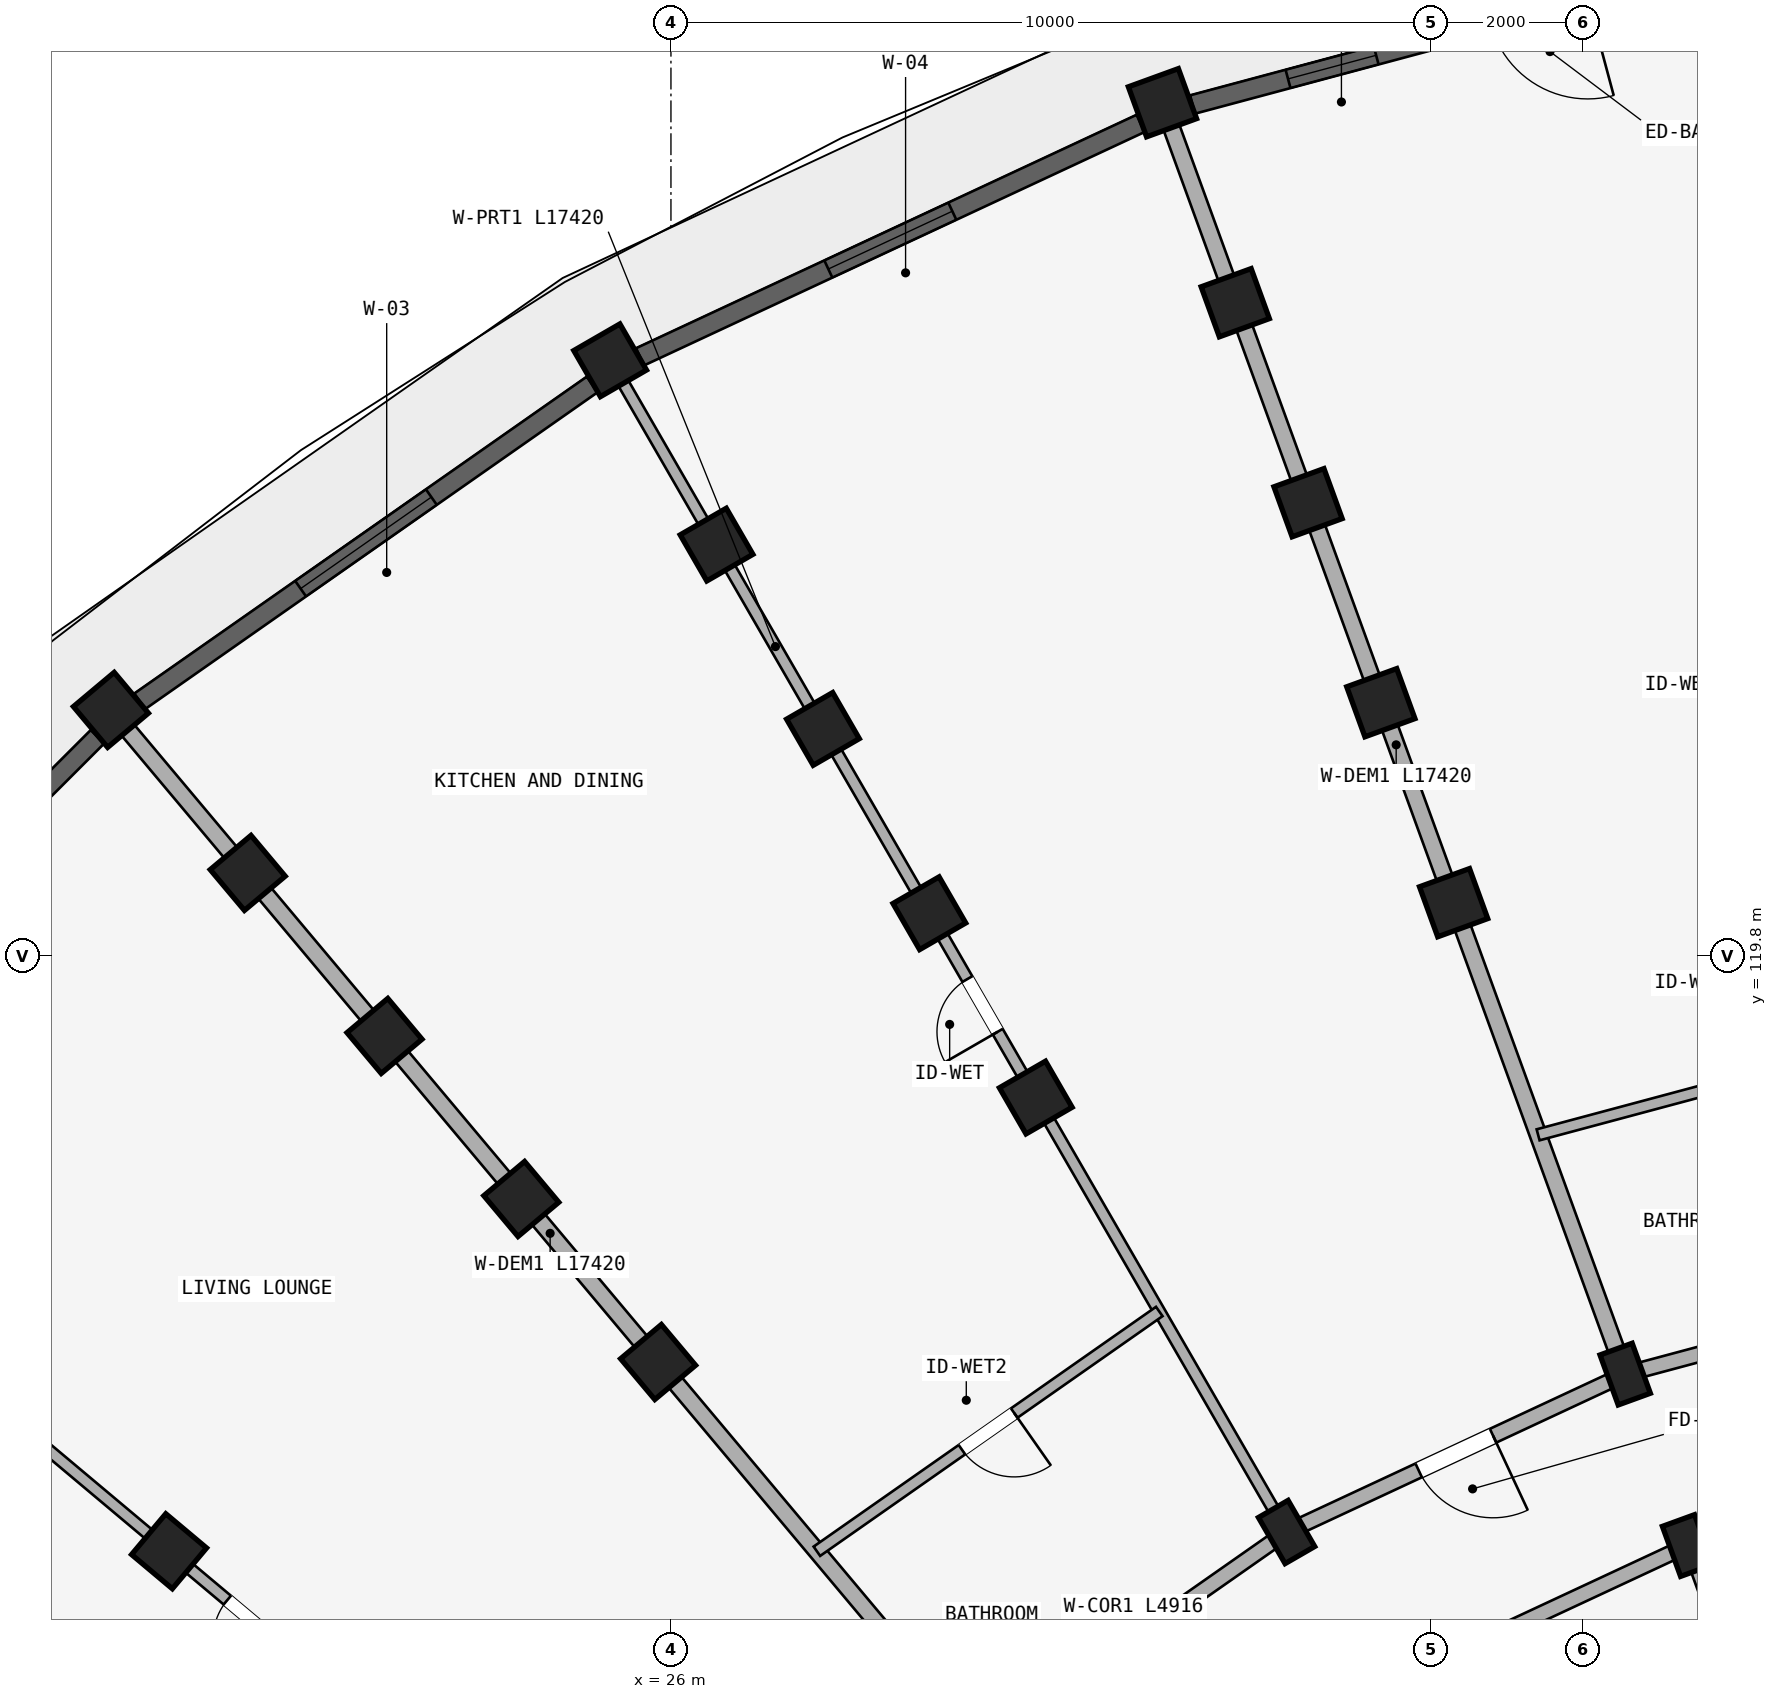
"""IFC4 building model, lengths in metres.
Left out: names, types, materials, properties, quantities, classifications, styles, units other than length and angle.
Written with IfcOpenShell. Run it as: python <this file> out.ifc"""

import sys

from ifc_helpers import new_model, si_unit, direction, frame, frame_2d, origin, origin_2d, place, context, subcontext, project, spatial, rectangle, extrude, element, fill, save


model = new_model("IFC4")
c1 = context("Model", 3, precision=1e-05, world=origin(), true_north=direction((0.0, 1.0)))
c2 = subcontext(c1, "Body", "Model", "MODEL_VIEW")
j1 = project(units=[si_unit("LENGTHUNIT", "METRE"), si_unit("PLANEANGLEUNIT", "RADIAN")], contexts=[c1])
p1 = place(None, origin())
s1 = spatial("IfcSite", under=j1, at=p1, CompositionType="ELEMENT")
p2 = place(p1, origin())
s2 = spatial("IfcBuilding", under=s1, at=p2, CompositionType="ELEMENT")
p3 = place(p2, frame((0.0, 0.0, 24.45)))
s3 = spatial("IfcBuildingStorey", under=s2, at=p3, CompositionType="ELEMENT", Elevation=24.45)
for number, where, z_axis, x_axis in (
    (1, (39.376, 112.044, 0.0), (0.0, 0.0, 1.0), (0.94, 0.342, 0.0)),
    (2, (38.555, 114.299, 0.0), (0.0, 0.0, 1.0), (0.94, 0.342, 0.0)),
):
    element("IfcColumn", number, at=place(p3, frame(where, z_axis=z_axis, x_axis=x_axis)), inside=s3, PredefinedType="COLUMN", context=c2, shape_type="SweptSolid", body=[
        extrude(rectangle(XDim=0.45, YDim=0.7, at=origin_2d()), origin(), (0.0, 0.0, 1.0), 2.93),
    ])
for number, where, z_axis, x_axis in (
    (3, (36.298, 120.501, 0.0), (0.0, 0.0, 1.0), (0.94, 0.342, 0.0)),
    (4, (35.34, 123.132, 0.0), (0.0, 0.0, 1.0), (0.94, 0.342, 0.0)),
    (5, (34.382, 125.764, 0.0), (0.0, 0.0, 1.0), (0.94, 0.342, 0.0)),
    (6, (33.425, 128.395, 0.0), (0.0, 0.0, 1.0), (0.94, 0.342, 0.0)),
    (7, (32.467, 131.026, 0.0), (0.0, 0.0, 1.0), (0.94, 0.342, 0.0)),
):
    element("IfcColumn", number, at=place(p3, frame(where, z_axis=z_axis, x_axis=x_axis)), inside=s3, PredefinedType="COLUMN", context=c2, shape_type="SweptSolid", body=[
        extrude(rectangle(XDim=0.7, YDim=0.7, at=origin_2d()), origin(), (0.0, 0.0, 1.0), 2.93),
    ])
p4 = place(p3, frame((34.1, 112.222, 0.0), z_axis=(0.0, 0.0, 1.0), x_axis=(0.866025403784, 0.5, 0.0)))
e8 = element("IfcColumn", 8, at=p4, inside=s3, PredefinedType="COLUMN", context=c2, shape_type="SweptSolid", body=[
    extrude(rectangle(XDim=0.45, YDim=0.7, at=origin_2d()), origin(), (0.0, 0.0, 1.0), 2.93),
])
for number, where, z_axis, x_axis in (
    (9, (30.8, 117.938, 0.0), (0.0, 0.0, 1.0), (0.866, 0.5, 0.0)),
    (10, (29.4, 120.363, 0.0), (0.0, 0.0, 1.0), (0.866, 0.5, 0.0)),
    (11, (28.0, 122.787, 0.0), (0.0, 0.0, 1.0), (0.866, 0.5, 0.0)),
    (12, (26.6, 125.212, 0.0), (0.0, 0.0, 1.0), (0.866, 0.5, 0.0)),
    (13, (25.2, 127.637, 0.0), (0.0, 0.0, 1.0), (0.866, 0.5, 0.0)),
    (14, (25.831, 114.458, 0.0), (0.0, 0.0, 1.0), (0.766, 0.643, 0.0)),
    (15, (24.031, 116.603, 0.0), (0.0, 0.0, 1.0), (0.766, 0.643, 0.0)),
    (16, (22.231, 118.748, 0.0), (0.0, 0.0, 1.0), (0.766, 0.643, 0.0)),
    (17, (20.432, 120.893, 0.0), (0.0, 0.0, 1.0), (0.766, 0.643, 0.0)),
    (18, (18.632, 123.038, 0.0), (0.0, 0.0, 1.0), (0.766, 0.643, 0.0)),
    (19, (19.397, 111.969, 0.0), (0.0, 0.0, 1.0), (0.643, 0.766, 0.0)),
):
    element("IfcColumn", number, at=place(p3, frame(where, z_axis=z_axis, x_axis=x_axis)), inside=s3, PredefinedType="COLUMN", context=c2, shape_type="SweptSolid", body=[
        extrude(rectangle(XDim=0.7, YDim=0.7, at=origin_2d()), origin(), (0.0, 0.0, 1.0), 2.93),
    ])
p5 = place(p3, frame((43.72, 113.208, 0.0), z_axis=(0.0, 0.0, 1.0), x_axis=(-0.965934240054, -0.258787642463, 0.0)))
e20 = element("IfcWall", 20, at=p5, inside=s3, PredefinedType="STANDARD", context=c2, shape_type="SweptSolid", body=[
    extrude(rectangle(XDim=4.497, YDim=0.2, at=frame_2d((2.249, 0.0))), origin(), (0.0, 0.0, 1.0), 2.372),
])
p6 = place(p3, frame((43.303, 115.572, 0.0), z_axis=(0.0, 0.0, 1.0), x_axis=(-0.965930095386, -0.258803112091, 0.0)))
e21 = element("IfcWall", 21, at=p6, inside=s3, PredefinedType="STANDARD", context=c2, shape_type="SweptSolid", body=[
    extrude(rectangle(XDim=4.916, YDim=0.2, at=frame_2d((2.458, 0.0))), origin(), (0.0, 0.0, 1.0), 2.372),
])
p7 = place(p3, frame((39.376, 112.044, 0.0), z_axis=(0.0, 0.0, 1.0), x_axis=(-0.906307919131, -0.422617978463, 0.0)))
e22 = element("IfcWall", 22, at=p7, inside=s3, PredefinedType="STANDARD", context=c2, shape_type="SweptSolid", body=[
    extrude(rectangle(XDim=4.497, YDim=0.2, at=frame_2d((2.249, 0.0))), origin(), (0.0, 0.0, 1.0), 2.372),
])
p8 = place(p3, frame((38.555, 114.299, 0.0), z_axis=(0.0, 0.0, 1.0), x_axis=(-0.906302381024, -0.422629854778, 0.0)))
e23 = element("IfcWall", 23, at=p8, inside=s3, PredefinedType="STANDARD", context=c2, shape_type="SweptSolid", body=[
    extrude(rectangle(XDim=4.915, YDim=0.2, at=frame_2d((2.458, 0.0))), origin(), (0.0, 0.0, 1.0), 2.372),
])
p9 = place(p8, frame((1.918, 0.0, 0.0)))
e24 = element("IfcOpeningElement", 24, at=p9, cuts=e23, PredefinedType="OPENING", context=c2, shape_type="SweptSolid", body=[
    extrude(rectangle(XDim=1.08, YDim=2.15, at=frame_2d((0.54, 1.075))), frame((0.0, 0.11, 0.0), z_axis=(0.0, -1.0, 0.0), x_axis=(1.0, 0.0, 0.0)), (0.0, 0.0, 1.0), 0.22),
])
p10 = place(p3, frame((34.1, 112.222, 0.0), z_axis=(0.0, 0.0, 1.0), x_axis=(-0.819140911474, -0.573592335331, 0.0)))
e25 = element("IfcWall", 25, at=p10, inside=s3, PredefinedType="STANDARD", context=c2, shape_type="SweptSolid", body=[
    extrude(rectangle(XDim=4.916, YDim=0.2, at=frame_2d((2.458, 0.0))), origin(), (0.0, 0.0, 1.0), 2.372),
])
p11 = place(p3, frame((41.702, 105.654, 0.0), z_axis=(0.0, 0.0, 1.0), x_axis=(-0.342010221662, 0.939696231917, 0.0)))
e26 = element("IfcWall", 26, at=p11, inside=s3, PredefinedType="PARTITIONING", context=c2, shape_type="SweptSolid", body=[
    extrude(rectangle(XDim=6.75, YDim=0.15, at=frame_2d((3.375, 0.0))), origin(), (0.0, 0.0, 1.0), 2.372),
])
p12 = place(p11, frame((3.242, 0.0, 0.0)))
e27 = element("IfcOpeningElement", 27, at=p12, cuts=e26, PredefinedType="OPENING", context=c2, shape_type="SweptSolid", body=[
    extrude(rectangle(XDim=0.94, YDim=2.1, at=frame_2d((0.47, 1.05))), frame((0.0, 0.085, 0.0), z_axis=(0.0, -1.0, 0.0), x_axis=(1.0, 0.0, 0.0)), (0.0, 0.0, 1.0), 0.17),
])
p13 = place(p3, frame((38.521, 114.393, 0.0), z_axis=(0.0, 0.0, 1.0), x_axis=(-0.342022120477, 0.939691901159, 0.0)))
e28 = element("IfcWall", 28, at=p13, inside=s3, PredefinedType="STANDARD", context=c2, shape_type="SweptSolid", body=[
    extrude(rectangle(XDim=17.42, YDim=0.22, at=frame_2d((8.71, 0.0))), origin(), (0.0, 0.0, 1.0), 2.372),
])
p14 = place(p3, frame((34.05, 112.309, 0.0), z_axis=(0.0, 0.0, 1.0), x_axis=(-0.499997843263, 0.866026648973, 0.0)))
e29 = element("IfcWall", 29, at=p14, inside=s3, PredefinedType="PARTITIONING", context=c2, shape_type="SweptSolid", body=[
    extrude(rectangle(XDim=17.42, YDim=0.15, at=frame_2d((8.71, 0.0))), origin(), (0.0, 0.0, 1.0), 2.372),
])
p15 = place(p14, frame((7.5, 0.0, 0.0)))
e30 = element("IfcOpeningElement", 30, at=p15, cuts=e29, PredefinedType="OPENING", context=c2, shape_type="SweptSolid", body=[
    extrude(rectangle(XDim=0.8, YDim=2.1, at=frame_2d((0.4, 1.05))), frame((0.0, 0.085, 0.0), z_axis=(0.0, -1.0, 0.0), x_axis=(1.0, 0.0, 0.0)), (0.0, 0.0, 1.0), 0.17),
])
p16 = place(p3, frame((30.009, 109.479, 0.0), z_axis=(0.0, 0.0, 1.0), x_axis=(-0.642784757967, 0.766046835987, 0.0)))
e31 = element("IfcWall", 31, at=p16, inside=s3, PredefinedType="STANDARD", context=c2, shape_type="SweptSolid", body=[
    extrude(rectangle(XDim=17.42, YDim=0.22, at=frame_2d((8.71, 0.0))), origin(), (0.0, 0.0, 1.0), 2.372),
])
p17 = place(p3, frame((26.521, 105.991, 0.0), z_axis=(0.0, 0.0, 1.0), x_axis=(-0.766046835987, 0.642784757967, 0.0)))
e32 = element("IfcWall", 32, at=p17, inside=s3, PredefinedType="PARTITIONING", context=c2, shape_type="SweptSolid", body=[
    extrude(rectangle(XDim=17.42, YDim=0.15, at=frame_2d((8.71, 0.0))), origin(), (0.0, 0.0, 1.0), 2.372),
])
p18 = place(p17, frame((7.5, 0.0, 0.0)))
e33 = element("IfcOpeningElement", 33, at=p18, cuts=e32, PredefinedType="OPENING", context=c2, shape_type="SweptSolid", body=[
    extrude(rectangle(XDim=0.8, YDim=2.1, at=frame_2d((0.4, 1.05))), frame((0.0, 0.085, 0.0), z_axis=(0.0, -1.0, 0.0), x_axis=(1.0, 0.0, 0.0)), (0.0, 0.0, 1.0), 0.17),
])
p19 = place(p3, frame((42.721, 118.871, 0.0), z_axis=(0.0, 0.0, 1.0), x_axis=(-0.965929227513, -0.258806351229, 0.0)))
e34 = element("IfcWall", 34, at=p19, inside=s3, PredefinedType="PLUMBINGWALL", context=c2, shape_type="SweptSolid", body=[
    extrude(rectangle(XDim=5.5, YDim=0.15, at=frame_2d((2.75, 0.0))), origin(), (0.0, 0.0, 1.0), 2.372),
])
p20 = place(p19, frame((2.37, 0.0, 0.0)))
e35 = element("IfcOpeningElement", 35, at=p20, cuts=e34, PredefinedType="OPENING", context=c2, shape_type="SweptSolid", body=[
    extrude(rectangle(XDim=0.76, YDim=2.05, at=frame_2d((0.38, 1.025))), frame((0.0, 0.085, 0.0), z_axis=(0.0, -1.0, 0.0), x_axis=(1.0, 0.0, 0.0)), (0.0, 0.0, 1.0), 0.17),
])
p21 = place(p3, frame((32.425, 115.123, 0.0), z_axis=(0.0, 0.0, 1.0), x_axis=(-0.819156831143, -0.573569599955, 0.0)))
e36 = element("IfcWall", 36, at=p21, inside=s3, PredefinedType="PLUMBINGWALL", context=c2, shape_type="SweptSolid", body=[
    extrude(rectangle(XDim=5.5, YDim=0.15, at=frame_2d((2.75, 0.0))), origin(), (0.0, 0.0, 1.0), 2.372),
])
p22 = place(p21, frame((2.33, 0.0, 0.0)))
e37 = element("IfcOpeningElement", 37, at=p22, cuts=e36, PredefinedType="OPENING", context=c2, shape_type="SweptSolid", body=[
    extrude(rectangle(XDim=0.84, YDim=2.1, at=frame_2d((0.42, 1.05))), frame((0.0, 0.085, 0.0), z_axis=(0.0, -1.0, 0.0), x_axis=(1.0, 0.0, 0.0)), (0.0, 0.0, 1.0), 0.17),
])
p23 = place(p3, frame((39.882, 132.883, 0.0), z_axis=(0.0, 0.0, 1.0), x_axis=(-0.965930355787, -0.258802140196, 0.0)))
e38 = element("IfcWall", 38, at=p23, inside=s3, PredefinedType="STANDARD", context=c2, shape_type="SweptSolid", body=[
    extrude(rectangle(XDim=7.267, YDim=0.25, at=frame_2d((3.633, 0.0))), origin(), (0.0, 0.0, 1.0), 2.372),
])
p24 = place(p23, frame((4.766, 0.0, 0.422)))
e39 = element("IfcOpeningElement", 39, at=p24, cuts=e38, PredefinedType="OPENING", context=c2, shape_type="SweptSolid", body=[
    extrude(rectangle(XDim=1.2, YDim=1.5, at=frame_2d((0.6, 0.75))), frame((0.0, 0.135, 0.0), z_axis=(0.0, -1.0, 0.0), x_axis=(1.0, 0.0, 0.0)), (0.0, 0.0, 1.0), 0.27),
])
p25 = place(p23, frame((1.883, 0.0, 0.0)))
e40 = element("IfcOpeningElement", 40, at=p25, cuts=e38, PredefinedType="OPENING", context=c2, shape_type="SweptSolid", body=[
    extrude(rectangle(XDim=1.32, YDim=2.15, at=frame_2d((0.66, 1.075))), frame((0.0, 0.135, 0.0), z_axis=(0.0, -1.0, 0.0), x_axis=(1.0, 0.0, 0.0)), (0.0, 0.0, 1.0), 0.27),
])
p26 = place(p3, frame((32.179, 130.754, 0.0), z_axis=(0.0, 0.0, 1.0), x_axis=(-0.90630327107, -0.422627946127, 0.0)))
e41 = element("IfcWall", 41, at=p26, inside=s3, PredefinedType="STANDARD", context=c2, shape_type="SweptSolid", body=[
    extrude(rectangle(XDim=7.267, YDim=0.25, at=frame_2d((3.633, 0.0))), origin(), (0.0, 0.0, 1.0), 2.372),
])
p27 = place(p26, frame((2.733, 0.0, 0.522)))
e42 = element("IfcOpeningElement", 42, at=p27, cuts=e41, PredefinedType="OPENING", context=c2, shape_type="SweptSolid", body=[
    extrude(rectangle(XDim=1.8, YDim=1.65, at=frame_2d((0.9, 0.825))), frame((0.0, 0.135, 0.0), z_axis=(0.0, -1.0, 0.0), x_axis=(1.0, 0.0, 0.0)), (0.0, 0.0, 1.0), 0.27),
])
p28 = place(p3, frame((24.964, 127.319, 0.0), z_axis=(0.0, 0.0, 1.0), x_axis=(-0.819159308599, -0.573566061701, 0.0)))
e43 = element("IfcWall", 43, at=p28, inside=s3, PredefinedType="STANDARD", context=c2, shape_type="SweptSolid", body=[
    extrude(rectangle(XDim=7.267, YDim=0.25, at=frame_2d((3.633, 0.0))), origin(), (0.0, 0.0, 1.0), 2.372),
])
p29 = place(p28, frame((2.583, 0.0, 0.372)))
e44 = element("IfcOpeningElement", 44, at=p29, cuts=e43, PredefinedType="OPENING", context=c2, shape_type="SweptSolid", body=[
    extrude(rectangle(XDim=2.1, YDim=1.8, at=frame_2d((1.05, 0.9))), frame((0.0, 0.135, 0.0), z_axis=(0.0, -1.0, 0.0), x_axis=(1.0, 0.0, 0.0)), (0.0, 0.0, 1.0), 0.27),
])
p30 = place(p3, frame((18.454, 122.684, 0.0), z_axis=(0.0, 0.0, 1.0), x_axis=(-0.707106781187, -0.707106781187, 0.0)))
e45 = element("IfcWall", 45, at=p30, inside=s3, PredefinedType="STANDARD", context=c2, shape_type="SweptSolid", body=[
    extrude(rectangle(XDim=7.267, YDim=0.25, at=frame_2d((3.633, 0.0))), origin(), (0.0, 0.0, 1.0), 2.372),
])
p31 = place(p30, frame((4.766, 0.0, 0.322)))
e46 = element("IfcOpeningElement", 46, at=p31, cuts=e45, PredefinedType="OPENING", context=c2, shape_type="SweptSolid", body=[
    extrude(rectangle(XDim=1.2, YDim=1.5, at=frame_2d((0.6, 0.75))), frame((0.0, 0.135, 0.0), z_axis=(0.0, -1.0, 0.0), x_axis=(1.0, 0.0, 0.0)), (0.0, 0.0, 1.0), 0.27),
])
p32 = place(p30, frame((1.883, 0.0, 0.0)))
e47 = element("IfcOpeningElement", 47, at=p32, cuts=e45, PredefinedType="OPENING", context=c2, shape_type="SweptSolid", body=[
    extrude(rectangle(XDim=1.32, YDim=2.15, at=frame_2d((0.66, 1.075))), frame((0.0, 0.135, 0.0), z_axis=(0.0, -1.0, 0.0), x_axis=(1.0, 0.0, 0.0)), (0.0, 0.0, 1.0), 0.27),
])
p33 = place(p24, origin())
e48 = element("IfcWindow", 48, at=p33, inside=s3, PartitioningType="SINGLE_PANEL", PredefinedType="WINDOW", context=c2, shape_type="SweptSolid", body=[
    extrude(rectangle(XDim=1.2, YDim=1.5, at=frame_2d((0.6, 0.75))), frame((0.0, 0.03, 0.0), z_axis=(0.0, -1.0, 0.0), x_axis=(1.0, 0.0, 0.0)), (0.0, 0.0, 1.0), 0.06),
])
fill(e39, e48)
p34 = place(p27, origin())
e49 = element("IfcWindow", 49, at=p34, inside=s3, PartitioningType="DOUBLE_PANEL_VERTICAL", PredefinedType="WINDOW", context=c2, shape_type="SweptSolid", body=[
    extrude(rectangle(XDim=1.8, YDim=1.65, at=frame_2d((0.9, 0.825))), frame((0.0, 0.03, 0.0), z_axis=(0.0, -1.0, 0.0), x_axis=(1.0, 0.0, 0.0)), (0.0, 0.0, 1.0), 0.06),
])
fill(e42, e49)
p35 = place(p29, origin())
e50 = element("IfcWindow", 50, at=p35, inside=s3, PartitioningType="TRIPLE_PANEL_VERTICAL", PredefinedType="WINDOW", context=c2, shape_type="SweptSolid", body=[
    extrude(rectangle(XDim=2.1, YDim=1.8, at=frame_2d((1.05, 0.9))), frame((0.0, 0.03, 0.0), z_axis=(0.0, -1.0, 0.0), x_axis=(1.0, 0.0, 0.0)), (0.0, 0.0, 1.0), 0.06),
])
fill(e44, e50)
p36 = place(p15, frame((0.8, 0.0, 0.0), z_axis=(0.0, 0.0, 1.0), x_axis=(-1.0, 0.0, 0.0)))
e51 = element("IfcDoor", 51, at=p36, inside=s3, OperationType="SINGLE_SWING_RIGHT", PredefinedType="DOOR", context=c2, shape_type="SweptSolid", body=[
    extrude(rectangle(XDim=0.8, YDim=2.1, at=frame_2d((0.4, 1.05))), frame((0.0, 0.025, 0.0), z_axis=(0.0, -1.0, 0.0), x_axis=(1.0, 0.0, 0.0)), (0.0, 0.0, 1.0), 0.05),
])
fill(e30, e51)
p37 = place(p18, origin())
e52 = element("IfcDoor", 52, at=p37, inside=s3, OperationType="SINGLE_SWING_LEFT", PredefinedType="DOOR", context=c2, shape_type="SweptSolid", body=[
    extrude(rectangle(XDim=0.8, YDim=2.1, at=frame_2d((0.4, 1.05))), frame((0.0, 0.025, 0.0), z_axis=(0.0, -1.0, 0.0), x_axis=(1.0, 0.0, 0.0)), (0.0, 0.0, 1.0), 0.05),
])
fill(e33, e52)
p38 = place(p9, frame((1.08, 0.0, 0.0), z_axis=(0.0, 0.0, 1.0), x_axis=(-1.0, 0.0, 0.0)))
e53 = element("IfcDoor", 53, at=p38, inside=s3, OperationType="SINGLE_SWING_RIGHT", PredefinedType="DOOR", context=c2, shape_type="SweptSolid", body=[
    extrude(rectangle(XDim=1.08, YDim=2.15, at=frame_2d((0.54, 1.075))), frame((0.0, 0.025, 0.0), z_axis=(0.0, -1.0, 0.0), x_axis=(1.0, 0.0, 0.0)), (0.0, 0.0, 1.0), 0.05),
])
fill(e24, e53)
p39 = place(p22, origin())
e54 = element("IfcDoor", 54, at=p39, inside=s3, OperationType="SINGLE_SWING_LEFT", PredefinedType="DOOR", context=c2, shape_type="SweptSolid", body=[
    extrude(rectangle(XDim=0.84, YDim=2.1, at=frame_2d((0.42, 1.05))), frame((0.0, 0.025, 0.0), z_axis=(0.0, -1.0, 0.0), x_axis=(1.0, 0.0, 0.0)), (0.0, 0.0, 1.0), 0.05),
])
fill(e37, e54)
save(model, sys.argv[1])
